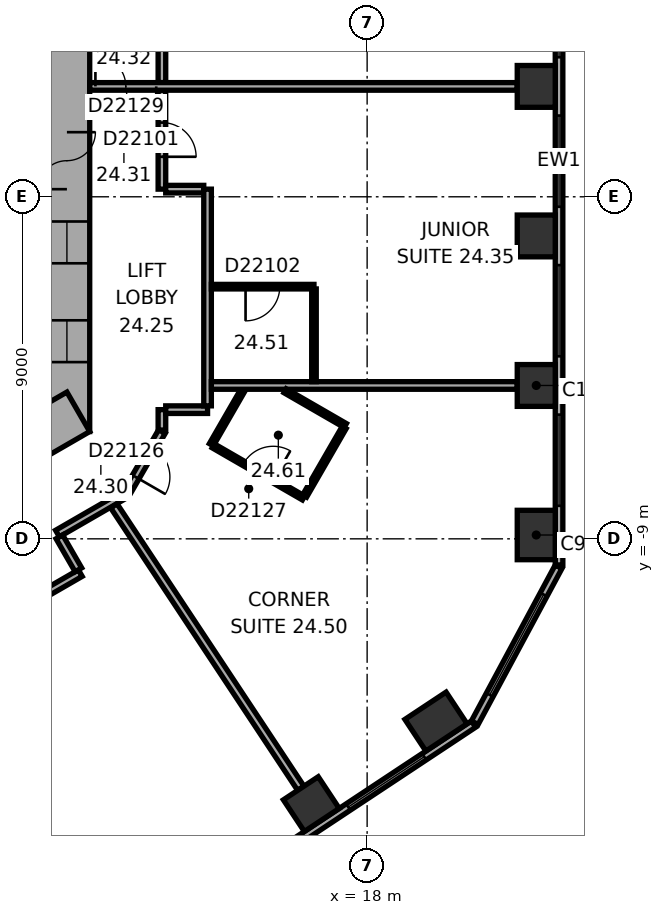
"""IFC4 building model, lengths in metres.
Left out: names, types, materials, properties, quantities, classifications, styles, units other than length and angle.
Written with IfcOpenShell. Run it as: python <this file> out.ifc"""

import sys

from ifc_helpers import new_model, si_unit, direction, frame, frame_2d, origin, origin_2d, place, context, subcontext, project, spatial, rectangle, extrude, element, fill, save


model = new_model("IFC4")
c1 = context("Model", 3, precision=1e-05, world=origin(), true_north=direction((0.0, 1.0)))
c2 = subcontext(c1, "Body", "Model", "MODEL_VIEW")
j1 = project(units=[si_unit("LENGTHUNIT", "METRE"), si_unit("PLANEANGLEUNIT", "RADIAN")], contexts=[c1])
p1 = place(None, origin())
s1 = spatial("IfcSite", under=j1, at=p1, CompositionType="ELEMENT")
p2 = place(p1, origin())
s2 = spatial("IfcBuilding", under=s1, at=p2, CompositionType="ELEMENT")
p3 = place(p2, frame((0.0, 0.0, 103.4)))
s3 = spatial("IfcBuildingStorey", under=s2, at=p3, CompositionType="ELEMENT", Elevation=103.4)
p4 = place(p3, frame((22.45, -8.899, 0.0), z_axis=(0.0, 0.0, 1.0), x_axis=(0.0, 1.0, 0.0)))
e1 = element("IfcColumn", 1, at=p4, inside=s3, PredefinedType="COLUMN", context=c2, shape_type="SweptSolid", body=[
    extrude(rectangle(XDim=1.3, YDim=1.0, at=origin_2d()), origin(), (0.0, 0.0, 1.0), 3.3),
])
for number, where, z_axis, x_axis in (
    (2, (22.45, -4.965, 0.0), (0.0, 0.0, 1.0), (0.0, 1.0, 0.0)),
    (3, (22.45, -1.03, 0.0), (0.0, 0.0, 1.0), (0.0, 1.0, 0.0)),
    (4, (22.45, 2.905, 0.0), (0.0, 0.0, 1.0), (0.0, 1.0, 0.0)),
    (5, (16.531, -15.981, 0.0), (0.0, 0.0, 1.0), (0.834, 0.552, 0.0)),
):
    element("IfcColumn", number, at=place(p3, frame(where, z_axis=z_axis, x_axis=x_axis)), inside=s3, PredefinedType="COLUMN", context=c2, shape_type="SweptSolid", body=[
        extrude(rectangle(XDim=1.1, YDim=1.0, at=origin_2d()), origin(), (0.0, 0.0, 1.0), 3.3),
    ])
p5 = place(p3, frame((19.812, -13.809, 0.0), z_axis=(0.0, 0.0, 1.0), x_axis=(0.833885822067, 0.551936985312, 0.0)))
e6 = element("IfcColumn", 6, at=p5, inside=s3, PredefinedType="COLUMN", context=c2, shape_type="SweptSolid", body=[
    extrude(rectangle(XDim=1.3, YDim=1.0, at=origin_2d()), origin(), (0.0, 0.0, 1.0), 3.3),
])
p6 = place(p3, frame((10.1, -6.177, 0.0), z_axis=(0.0, 0.0, 1.0), x_axis=(0.0, 1.0, 0.0)))
e7 = element("IfcWall", 7, at=p6, inside=s3, PredefinedType="SHEAR", context=c2, shape_type="SweptSolid", body=[
    extrude(rectangle(XDim=12.355, YDim=1.2, at=frame_2d((6.177, 0.0))), origin(), (0.0, 0.0, 1.0), 3.3),
])
p7 = place(p6, frame((6.378, 0.0, 0.0)))
e8 = element("IfcOpeningElement", 8, at=p7, cuts=e7, PredefinedType="OPENING", context=c2, shape_type="SweptSolid", body=[
    extrude(rectangle(XDim=1.5, YDim=2.1, at=frame_2d((0.75, 1.05))), frame((0.0, 0.61, 0.0), z_axis=(0.0, -1.0, 0.0), x_axis=(1.0, 0.0, 0.0)), (0.0, 0.0, 1.0), 1.22),
])
p8 = place(p6, frame((1.828, 0.0, 0.0)))
e9 = element("IfcOpeningElement", 9, at=p8, cuts=e7, PredefinedType="OPENING", context=c2, shape_type="SweptSolid", body=[
    extrude(rectangle(XDim=1.1, YDim=2.1, at=frame_2d((0.55, 1.05))), frame((0.0, 0.61, 0.0), z_axis=(0.0, -1.0, 0.0), x_axis=(1.0, 0.0, 0.0)), (0.0, 0.0, 1.0), 1.22),
])
p9 = place(p6, frame((4.427, 0.0, 0.0)))
e10 = element("IfcOpeningElement", 10, at=p9, cuts=e7, PredefinedType="OPENING", context=c2, shape_type="SweptSolid", body=[
    extrude(rectangle(XDim=1.1, YDim=2.1, at=frame_2d((0.55, 1.05))), frame((0.0, 0.61, 0.0), z_axis=(0.0, -1.0, 0.0), x_axis=(1.0, 0.0, 0.0)), (0.0, 0.0, 1.0), 1.22),
])
p10 = place(p3, frame((-0.3, -11.836, 0.0), z_axis=(0.0, 0.0, 1.0), x_axis=(0.866021384402, 0.500006961711, 0.0)))
e11 = element("IfcWall", 11, at=p10, inside=s3, PredefinedType="SHEAR", context=c2, shape_type="SweptSolid", body=[
    extrude(rectangle(XDim=12.355, YDim=1.2, at=frame_2d((6.178, 0.0))), origin(), (0.0, 0.0, 1.0), 3.3),
])
p11 = place(p10, frame((4.128, 0.0, 0.0)))
e12 = element("IfcOpeningElement", 12, at=p11, cuts=e11, PredefinedType="OPENING", context=c2, shape_type="SweptSolid", body=[
    extrude(rectangle(XDim=0.9, YDim=2.1, at=frame_2d((0.45, 1.05))), frame((0.0, 0.61, 0.0), z_axis=(0.0, -1.0, 0.0), x_axis=(1.0, 0.0, 0.0)), (0.0, 0.0, 1.0), 1.22),
])
p12 = place(p10, frame((7.928, 0.0, 0.0)))
e13 = element("IfcOpeningElement", 13, at=p12, cuts=e11, PredefinedType="OPENING", context=c2, shape_type="SweptSolid", body=[
    extrude(rectangle(XDim=1.1, YDim=2.1, at=frame_2d((0.55, 1.05))), frame((0.0, 0.61, 0.0), z_axis=(0.0, -1.0, 0.0), x_axis=(1.0, 0.0, 0.0)), (0.0, 0.0, 1.0), 1.22),
])
p13 = place(p3, frame((23.05, -9.687, 0.0), z_axis=(0.0, 0.0, 1.0), x_axis=(0.0, 1.0, 0.0)))
e14 = element("IfcWall", 14, at=p13, inside=s3, PredefinedType="STANDARD", context=c2, shape_type="SweptSolid", body=[
    extrude(rectangle(XDim=21.246, YDim=0.2, at=frame_2d((10.623, 0.0))), origin(), (0.0, 0.0, 1.0), 3.3),
])
p14 = place(p13, frame((1.555, 0.0, 0.8)))
e15 = element("IfcOpeningElement", 15, at=p14, cuts=e14, PredefinedType="OPENING", context=c2, shape_type="SweptSolid", body=[
    extrude(rectangle(XDim=2.4, YDim=1.7, at=frame_2d((1.2, 0.85))), frame((0.0, 0.11, 0.0), z_axis=(0.0, -1.0, 0.0), x_axis=(1.0, 0.0, 0.0)), (0.0, 0.0, 1.0), 0.22),
])
p15 = place(p13, frame((5.489, 0.0, 0.8)))
e16 = element("IfcOpeningElement", 16, at=p15, cuts=e14, PredefinedType="OPENING", context=c2, shape_type="SweptSolid", body=[
    extrude(rectangle(XDim=2.4, YDim=1.7, at=frame_2d((1.2, 0.85))), frame((0.0, 0.11, 0.0), z_axis=(0.0, -1.0, 0.0), x_axis=(1.0, 0.0, 0.0)), (0.0, 0.0, 1.0), 0.22),
])
p16 = place(p13, frame((9.424, 0.0, 0.8)))
e17 = element("IfcOpeningElement", 17, at=p16, cuts=e14, PredefinedType="OPENING", context=c2, shape_type="SweptSolid", body=[
    extrude(rectangle(XDim=2.4, YDim=1.7, at=frame_2d((1.2, 0.85))), frame((0.0, 0.11, 0.0), z_axis=(0.0, -1.0, 0.0), x_axis=(1.0, 0.0, 0.0)), (0.0, 0.0, 1.0), 0.22),
])
p17 = place(p13, frame((13.358, 0.0, 0.8)))
e18 = element("IfcOpeningElement", 18, at=p17, cuts=e14, PredefinedType="OPENING", context=c2, shape_type="SweptSolid", body=[
    extrude(rectangle(XDim=2.4, YDim=1.7, at=frame_2d((1.2, 0.85))), frame((0.0, 0.11, 0.0), z_axis=(0.0, -1.0, 0.0), x_axis=(1.0, 0.0, 0.0)), (0.0, 0.0, 1.0), 0.22),
])
p18 = place(p13, frame((17.293, 0.0, 0.8)))
e19 = element("IfcOpeningElement", 19, at=p18, cuts=e14, PredefinedType="OPENING", context=c2, shape_type="SweptSolid", body=[
    extrude(rectangle(XDim=2.4, YDim=1.7, at=frame_2d((1.2, 0.85))), frame((0.0, 0.11, 0.0), z_axis=(0.0, -1.0, 0.0), x_axis=(1.0, 0.0, 0.0)), (0.0, 0.0, 1.0), 0.22),
])
p19 = place(p3, frame((3.083, -25.601, 0.0), z_axis=(0.0, 0.0, 1.0), x_axis=(0.833884295743, 0.551939291329, 0.0)))
e20 = element("IfcWall", 20, at=p19, inside=s3, PredefinedType="STANDARD", context=c2, shape_type="SweptSolid", body=[
    extrude(rectangle(XDim=21.246, YDim=0.2, at=frame_2d((10.623, 0.0))), origin(), (0.0, 0.0, 1.0), 3.3),
])
p20 = place(p19, frame((1.553, 0.0, 0.8)))
e21 = element("IfcOpeningElement", 21, at=p20, cuts=e20, PredefinedType="OPENING", context=c2, shape_type="SweptSolid", body=[
    extrude(rectangle(XDim=2.4, YDim=1.7, at=frame_2d((1.2, 0.85))), frame((0.0, 0.11, 0.0), z_axis=(0.0, -1.0, 0.0), x_axis=(1.0, 0.0, 0.0)), (0.0, 0.0, 1.0), 0.22),
])
p21 = place(p19, frame((5.488, 0.0, 0.8)))
e22 = element("IfcOpeningElement", 22, at=p21, cuts=e20, PredefinedType="OPENING", context=c2, shape_type="SweptSolid", body=[
    extrude(rectangle(XDim=2.4, YDim=1.7, at=frame_2d((1.2, 0.85))), frame((0.0, 0.11, 0.0), z_axis=(0.0, -1.0, 0.0), x_axis=(1.0, 0.0, 0.0)), (0.0, 0.0, 1.0), 0.22),
])
p22 = place(p19, frame((9.422, 0.0, 0.8)))
e23 = element("IfcOpeningElement", 23, at=p22, cuts=e20, PredefinedType="OPENING", context=c2, shape_type="SweptSolid", body=[
    extrude(rectangle(XDim=2.4, YDim=1.7, at=frame_2d((1.2, 0.85))), frame((0.0, 0.11, 0.0), z_axis=(0.0, -1.0, 0.0), x_axis=(1.0, 0.0, 0.0)), (0.0, 0.0, 1.0), 0.22),
])
p23 = place(p19, frame((13.357, 0.0, 0.8)))
e24 = element("IfcOpeningElement", 24, at=p23, cuts=e20, PredefinedType="OPENING", context=c2, shape_type="SweptSolid", body=[
    extrude(rectangle(XDim=2.4, YDim=1.7, at=frame_2d((1.2, 0.85))), frame((0.0, 0.11, 0.0), z_axis=(0.0, -1.0, 0.0), x_axis=(1.0, 0.0, 0.0)), (0.0, 0.0, 1.0), 0.22),
])
p24 = place(p19, frame((17.291, 0.0, 0.8)))
e25 = element("IfcOpeningElement", 25, at=p24, cuts=e20, PredefinedType="OPENING", context=c2, shape_type="SweptSolid", body=[
    extrude(rectangle(XDim=2.4, YDim=1.7, at=frame_2d((1.2, 0.85))), frame((0.0, 0.11, 0.0), z_axis=(0.0, -1.0, 0.0), x_axis=(1.0, 0.0, 0.0)), (0.0, 0.0, 1.0), 0.22),
])
p25 = place(p3, frame((20.833, -13.839, 0.0), z_axis=(0.0, 0.0, 1.0), x_axis=(0.473321668581, 0.880889662813, 0.0)))
e26 = element("IfcWall", 26, at=p25, inside=s3, PredefinedType="STANDARD", context=c2, shape_type="SweptSolid", body=[
    extrude(rectangle(XDim=4.66, YDim=0.2, at=frame_2d((2.33, 0.0))), origin(), (0.0, 0.0, 1.0), 3.3),
])
p26 = place(p25, frame((0.83, 0.0, 0.8)))
e27 = element("IfcOpeningElement", 27, at=p26, cuts=e26, PredefinedType="OPENING", context=c2, shape_type="SweptSolid", body=[
    extrude(rectangle(XDim=3.0, YDim=1.7, at=frame_2d((1.5, 0.85))), frame((0.0, 0.11, 0.0), z_axis=(0.0, -1.0, 0.0), x_axis=(1.0, 0.0, 0.0)), (0.0, 0.0, 1.0), 0.22),
])
p27 = place(p3, frame((7.419, -11.653, 0.0), z_axis=(0.0, 0.0, 1.0), x_axis=(0.866038154057, 0.49997791523, 0.0)))
e28 = element("IfcWall", 28, at=p27, inside=s3, PredefinedType="PARTITIONING", context=c2, shape_type="SweptSolid", body=[
    extrude(rectangle(XDim=3.502, YDim=0.2, at=frame_2d((1.751, 0.0))), origin(), (0.0, 0.0, 1.0), 3.05),
])
p28 = place(p3, frame((9.852, -8.861, 0.0), z_axis=(0.0, 0.0, 1.0), x_axis=(0.866013291437, 0.500020978615, 0.0)))
e29 = element("IfcWall", 29, at=p28, inside=s3, PredefinedType="PARTITIONING", context=c2, shape_type="SweptSolid", body=[
    extrude(rectangle(XDim=2.077, YDim=0.2, at=frame_2d((1.038, 0.0))), origin(), (0.0, 0.0, 1.0), 3.05),
])
p29 = place(p3, frame((10.402, -9.815, 0.0), z_axis=(0.0, 0.0, 1.0), x_axis=(-0.499968756647, 0.866043441391, 0.0)))
e30 = element("IfcWall", 30, at=p29, inside=s3, PredefinedType="PARTITIONING", context=c2, shape_type="SweptSolid", body=[
    extrude(rectangle(XDim=1.001, YDim=0.2, at=frame_2d((0.5, 0.0))), origin(), (0.0, 0.0, 1.0), 3.05),
])
p30 = place(p3, frame((11.67, -7.788, 0.0), z_axis=(0.0, 0.0, 1.0), x_axis=(0.500063286585, 0.865988862174, 0.0)))
e31 = element("IfcWall", 31, at=p30, inside=s3, PredefinedType="PARTITIONING", context=c2, shape_type="SweptSolid", body=[
    extrude(rectangle(XDim=1.86, YDim=0.2, at=frame_2d((0.93, 0.0))), origin(), (0.0, 0.0, 1.0), 3.05),
])
p31 = place(p30, frame((0.48, 0.0, 0.0)))
e32 = element("IfcOpeningElement", 32, at=p31, cuts=e31, PredefinedType="OPENING", context=c2, shape_type="SweptSolid", body=[
    extrude(rectangle(XDim=0.9, YDim=2.1, at=frame_2d((0.45, 1.05))), frame((0.0, 0.11, 0.0), z_axis=(0.0, -1.0, 0.0), x_axis=(1.0, 0.0, 0.0)), (0.0, 0.0, 1.0), 0.22),
])
p32 = place(p3, frame((12.6, -6.138, 0.0), z_axis=(0.0, 0.0, 1.0), x_axis=(0.0, 1.0, 0.0)))
e33 = element("IfcWall", 33, at=p32, inside=s3, PredefinedType="PARTITIONING", context=c2, shape_type="SweptSolid", body=[
    extrude(rectangle(XDim=0.537, YDim=0.2, at=frame_2d((0.268, 0.0))), origin(), (0.0, 0.0, 1.0), 3.05),
])
p33 = place(p3, frame((12.6, 0.201, 0.0), z_axis=(0.0, 0.0, 1.0), x_axis=(0.0, 1.0, 0.0)))
e34 = element("IfcWall", 34, at=p33, inside=s3, PredefinedType="PARTITIONING", context=c2, shape_type="SweptSolid", body=[
    extrude(rectangle(XDim=2.604, YDim=0.2, at=frame_2d((1.302, 0.0))), origin(), (0.0, 0.0, 1.0), 3.05),
])
p34 = place(p33, frame((0.852, 0.0, 0.0)))
e35 = element("IfcOpeningElement", 35, at=p34, cuts=e34, PredefinedType="OPENING", context=c2, shape_type="SweptSolid", body=[
    extrude(rectangle(XDim=0.9, YDim=2.1, at=frame_2d((0.45, 1.05))), frame((0.0, 0.11, 0.0), z_axis=(0.0, -1.0, 0.0), x_axis=(1.0, 0.0, 0.0)), (0.0, 0.0, 1.0), 0.22),
])
p35 = place(p3, frame((12.6, 3.004, 0.0), z_axis=(0.0, 0.0, 1.0), x_axis=(0.0, 1.0, 0.0)))
e36 = element("IfcWall", 36, at=p35, inside=s3, PredefinedType="PARTITIONING", context=c2, shape_type="SweptSolid", body=[
    extrude(rectangle(XDim=3.173, YDim=0.2, at=frame_2d((1.586, 0.0))), origin(), (0.0, 0.0, 1.0), 3.05),
])
p36 = place(p35, frame((1.136, 0.0, 0.0)))
e37 = element("IfcOpeningElement", 37, at=p36, cuts=e36, PredefinedType="OPENING", context=c2, shape_type="SweptSolid", body=[
    extrude(rectangle(XDim=0.9, YDim=2.1, at=frame_2d((0.45, 1.05))), frame((0.0, 0.11, 0.0), z_axis=(0.0, -1.0, 0.0), x_axis=(1.0, 0.0, 0.0)), (0.0, 0.0, 1.0), 0.22),
])
p37 = place(p3, frame((12.7, -5.601, 0.0), z_axis=(0.0, 0.0, 1.0), x_axis=(1.0, 0.0, 0.0)))
e38 = element("IfcWall", 38, at=p37, inside=s3, PredefinedType="PARTITIONING", context=c2, shape_type="SweptSolid", body=[
    extrude(rectangle(XDim=1.101, YDim=0.2, at=frame_2d((0.551, 0.0))), origin(), (0.0, 0.0, 1.0), 3.05),
])
p38 = place(p3, frame((13.701, 0.201, 0.0), z_axis=(0.0, 0.0, 1.0), x_axis=(-1.0, 0.0, 0.0)))
e39 = element("IfcWall", 39, at=p38, inside=s3, PredefinedType="PARTITIONING", context=c2, shape_type="SweptSolid", body=[
    extrude(rectangle(XDim=1.001, YDim=0.2, at=frame_2d((0.5, 0.0))), origin(), (0.0, 0.0, 1.0), 3.05),
])
p39 = place(p3, frame((13.801, -5.501, 0.0), z_axis=(0.0, 0.0, 1.0), x_axis=(0.0, 1.0, 0.0)))
e40 = element("IfcWall", 40, at=p39, inside=s3, PredefinedType="PARTITIONING", context=c2, shape_type="SweptSolid", body=[
    extrude(rectangle(XDim=5.702, YDim=0.2, at=frame_2d((2.851, 0.0))), origin(), (0.0, 0.0, 1.0), 3.05),
])
p40 = place(p3, frame((13.901, -6.524, 0.0), z_axis=(0.0, 0.0, 1.0), x_axis=(0.499964162598, 0.86604609353, 0.0)))
e41 = element("IfcWall", 41, at=p40, inside=s3, PredefinedType="PARTITIONING", context=c2, shape_type="SweptSolid", body=[
    extrude(rectangle(XDim=1.661, YDim=0.12, at=frame_2d((0.831, 0.0))), origin(), (0.0, 0.0, 1.0), 3.05),
])
p41 = place(p3, frame((13.901, -4.965, 0.0), z_axis=(0.0, 0.0, 1.0), x_axis=(1.0, 0.0, 0.0)))
e42 = element("IfcWall", 42, at=p41, inside=s3, PredefinedType="PARTITIONING", context=c2, shape_type="SweptSolid", body=[
    extrude(rectangle(XDim=8.049, YDim=0.2, at=frame_2d((4.024, 0.0))), origin(), (0.0, 0.0, 1.0), 3.05),
])
p42 = place(p3, frame((13.901, -2.365, 0.0), z_axis=(0.0, 0.0, 1.0), x_axis=(1.0, 0.0, 0.0)))
e43 = element("IfcWall", 43, at=p42, inside=s3, PredefinedType="PARTITIONING", context=c2, shape_type="SweptSolid", body=[
    extrude(rectangle(XDim=2.7, YDim=0.12, at=frame_2d((1.35, 0.0))), origin(), (0.0, 0.0, 1.0), 3.05),
])
p43 = place(p42, frame((0.9, 0.0, 0.0)))
e44 = element("IfcOpeningElement", 44, at=p43, cuts=e43, PredefinedType="OPENING", context=c2, shape_type="SweptSolid", body=[
    extrude(rectangle(XDim=0.9, YDim=2.1, at=frame_2d((0.45, 1.05))), frame((0.0, 0.07, 0.0), z_axis=(0.0, -1.0, 0.0), x_axis=(1.0, 0.0, 0.0)), (0.0, 0.0, 1.0), 0.14),
])
p44 = place(p3, frame((15.841, -5.104, 0.0), z_axis=(0.0, 0.0, 1.0), x_axis=(0.866025591402, -0.499999675036, 0.0)))
e45 = element("IfcWall", 45, at=p44, inside=s3, PredefinedType="PARTITIONING", context=c2, shape_type="SweptSolid", body=[
    extrude(rectangle(XDim=1.83, YDim=0.12, at=frame_2d((0.915, 0.0))), origin(), (0.0, 0.0, 1.0), 3.05),
])
p45 = place(p3, frame((16.255, -15.564, 0.0), z_axis=(0.0, 0.0, 1.0), x_axis=(-0.55192208744, 0.833895682562, 0.0)))
e46 = element("IfcWall", 46, at=p45, inside=s3, PredefinedType="PARTITIONING", context=c2, shape_type="SweptSolid", body=[
    extrude(rectangle(XDim=8.913, YDim=0.2, at=frame_2d((4.457, 0.0))), origin(), (0.0, 0.0, 1.0), 2.6),
])
p46 = place(p3, frame((16.326, -7.925, 0.0), z_axis=(0.0, 0.0, 1.0), x_axis=(-0.865997131366, 0.500048966069, 0.0)))
e47 = element("IfcWall", 47, at=p46, inside=s3, PredefinedType="PARTITIONING", context=c2, shape_type="SweptSolid", body=[
    extrude(rectangle(XDim=2.74, YDim=0.12, at=frame_2d((1.37, 0.0))), origin(), (0.0, 0.0, 1.0), 3.05),
])
p47 = place(p46, frame((0.92, 0.0, 0.0)))
e48 = element("IfcOpeningElement", 48, at=p47, cuts=e47, PredefinedType="OPENING", context=c2, shape_type="SweptSolid", body=[
    extrude(rectangle(XDim=0.9, YDim=2.1, at=frame_2d((0.45, 1.05))), frame((0.0, 0.07, 0.0), z_axis=(0.0, -1.0, 0.0), x_axis=(1.0, 0.0, 0.0)), (0.0, 0.0, 1.0), 0.14),
])
p48 = place(p3, frame((16.601, -2.425, 0.0), z_axis=(0.0, 0.0, 1.0), x_axis=(0.0, -1.0, 0.0)))
e49 = element("IfcWall", 49, at=p48, inside=s3, PredefinedType="PARTITIONING", context=c2, shape_type="SweptSolid", body=[
    extrude(rectangle(XDim=2.44, YDim=0.12, at=frame_2d((1.22, 0.0))), origin(), (0.0, 0.0, 1.0), 3.05),
])
p49 = place(p3, frame((17.396, -6.071, 0.0), z_axis=(0.0, 0.0, 1.0), x_axis=(-0.500027264788, -0.866009661879, 0.0)))
e50 = element("IfcWall", 50, at=p49, inside=s3, PredefinedType="PARTITIONING", context=c2, shape_type="SweptSolid", body=[
    extrude(rectangle(XDim=2.08, YDim=0.12, at=frame_2d((1.04, 0.0))), origin(), (0.0, 0.0, 1.0), 3.05),
])
p50 = place(p3, frame((21.95, 2.905, 0.0), z_axis=(0.0, 0.0, 1.0), x_axis=(-1.0, 0.0, 0.0)))
e51 = element("IfcWall", 51, at=p50, inside=s3, PredefinedType="PARTITIONING", context=c2, shape_type="SweptSolid", body=[
    extrude(rectangle(XDim=11.25, YDim=0.2, at=frame_2d((5.625, 0.0))), origin(), (0.0, 0.0, 1.0), 3.05),
])
p51 = place(p50, frame((9.5, 0.0, 0.0)))
e52 = element("IfcOpeningElement", 52, at=p51, cuts=e51, PredefinedType="OPENING", context=c2, shape_type="SweptSolid", body=[
    extrude(rectangle(XDim=1.6, YDim=2.1, at=frame_2d((0.8, 1.05))), frame((0.0, 0.11, 0.0), z_axis=(0.0, -1.0, 0.0), x_axis=(1.0, 0.0, 0.0)), (0.0, 0.0, 1.0), 0.22),
])
p52 = place(p14, origin())
e53 = element("IfcWindow", 53, at=p52, inside=s3, PartitioningType="SINGLE_PANEL", PredefinedType="WINDOW", context=c2, shape_type="SweptSolid", body=[
    extrude(rectangle(XDim=2.4, YDim=1.7, at=frame_2d((1.2, 0.85))), frame((0.0, 0.03, 0.0), z_axis=(0.0, -1.0, 0.0), x_axis=(1.0, 0.0, 0.0)), (0.0, 0.0, 1.0), 0.06),
])
fill(e15, e53)
p53 = place(p15, origin())
e54 = element("IfcWindow", 54, at=p53, inside=s3, PartitioningType="SINGLE_PANEL", PredefinedType="WINDOW", context=c2, shape_type="SweptSolid", body=[
    extrude(rectangle(XDim=2.4, YDim=1.7, at=frame_2d((1.2, 0.85))), frame((0.0, 0.03, 0.0), z_axis=(0.0, -1.0, 0.0), x_axis=(1.0, 0.0, 0.0)), (0.0, 0.0, 1.0), 0.06),
])
fill(e16, e54)
p54 = place(p16, origin())
e55 = element("IfcWindow", 55, at=p54, inside=s3, PartitioningType="SINGLE_PANEL", PredefinedType="WINDOW", context=c2, shape_type="SweptSolid", body=[
    extrude(rectangle(XDim=2.4, YDim=1.7, at=frame_2d((1.2, 0.85))), frame((0.0, 0.03, 0.0), z_axis=(0.0, -1.0, 0.0), x_axis=(1.0, 0.0, 0.0)), (0.0, 0.0, 1.0), 0.06),
])
fill(e17, e55)
p55 = place(p17, origin())
e56 = element("IfcWindow", 56, at=p55, inside=s3, PartitioningType="SINGLE_PANEL", PredefinedType="WINDOW", context=c2, shape_type="SweptSolid", body=[
    extrude(rectangle(XDim=2.4, YDim=1.7, at=frame_2d((1.2, 0.85))), frame((0.0, 0.03, 0.0), z_axis=(0.0, -1.0, 0.0), x_axis=(1.0, 0.0, 0.0)), (0.0, 0.0, 1.0), 0.06),
])
fill(e18, e56)
p56 = place(p24, origin())
e57 = element("IfcWindow", 57, at=p56, inside=s3, PartitioningType="SINGLE_PANEL", PredefinedType="WINDOW", context=c2, shape_type="SweptSolid", body=[
    extrude(rectangle(XDim=2.4, YDim=1.7, at=frame_2d((1.2, 0.85))), frame((0.0, 0.03, 0.0), z_axis=(0.0, -1.0, 0.0), x_axis=(1.0, 0.0, 0.0)), (0.0, 0.0, 1.0), 0.06),
])
fill(e25, e57)
p57 = place(p26, origin())
e58 = element("IfcWindow", 58, at=p57, inside=s3, PartitioningType="SINGLE_PANEL", PredefinedType="WINDOW", context=c2, shape_type="SweptSolid", body=[
    extrude(rectangle(XDim=3.0, YDim=1.7, at=frame_2d((1.5, 0.85))), frame((0.0, 0.03, 0.0), z_axis=(0.0, -1.0, 0.0), x_axis=(1.0, 0.0, 0.0)), (0.0, 0.0, 1.0), 0.06),
])
fill(e27, e58)
p58 = place(p7, origin())
e59 = element("IfcDoor", 59, at=p58, inside=s3, OperationType="DOUBLE_DOOR_SINGLE_SWING", PredefinedType="DOOR", context=c2, shape_type="SweptSolid", body=[
    extrude(rectangle(XDim=1.5, YDim=2.1, at=frame_2d((0.75, 1.05))), frame((0.0, 0.025, 0.0), z_axis=(0.0, -1.0, 0.0), x_axis=(1.0, 0.0, 0.0)), (0.0, 0.0, 1.0), 0.05),
])
fill(e8, e59)
p59 = place(p8, origin())
e60 = element("IfcDoor", 60, at=p59, inside=s3, OperationType="DOUBLE_DOOR_SLIDING", PredefinedType="DOOR", context=c2, shape_type="SweptSolid", body=[
    extrude(rectangle(XDim=1.1, YDim=2.1, at=frame_2d((0.55, 1.05))), frame((0.0, 0.025, 0.0), z_axis=(0.0, -1.0, 0.0), x_axis=(1.0, 0.0, 0.0)), (0.0, 0.0, 1.0), 0.05),
])
fill(e9, e60)
p60 = place(p9, origin())
e61 = element("IfcDoor", 61, at=p60, inside=s3, OperationType="DOUBLE_DOOR_SLIDING", PredefinedType="DOOR", context=c2, shape_type="SweptSolid", body=[
    extrude(rectangle(XDim=1.1, YDim=2.1, at=frame_2d((0.55, 1.05))), frame((0.0, 0.025, 0.0), z_axis=(0.0, -1.0, 0.0), x_axis=(1.0, 0.0, 0.0)), (0.0, 0.0, 1.0), 0.05),
])
fill(e10, e61)
p61 = place(p34, origin())
e62 = element("IfcDoor", 62, at=p61, inside=s3, OperationType="SINGLE_SWING_LEFT", PredefinedType="DOOR", context=c2, shape_type="SweptSolid", body=[
    extrude(rectangle(XDim=0.9, YDim=2.1, at=frame_2d((0.45, 1.05))), frame((0.0, 0.025, 0.0), z_axis=(0.0, -1.0, 0.0), x_axis=(1.0, 0.0, 0.0)), (0.0, 0.0, 1.0), 0.05),
])
fill(e35, e62)
p62 = place(p43, origin())
e63 = element("IfcDoor", 63, at=p62, inside=s3, OperationType="SINGLE_SWING_LEFT", PredefinedType="DOOR", context=c2, shape_type="SweptSolid", body=[
    extrude(rectangle(XDim=0.9, YDim=2.1, at=frame_2d((0.45, 1.05))), frame((0.0, 0.025, 0.0), z_axis=(0.0, -1.0, 0.0), x_axis=(1.0, 0.0, 0.0)), (0.0, 0.0, 1.0), 0.05),
])
fill(e44, e63)
p63 = place(p31, origin())
e64 = element("IfcDoor", 64, at=p63, inside=s3, OperationType="SINGLE_SWING_LEFT", PredefinedType="DOOR", context=c2, shape_type="SweptSolid", body=[
    extrude(rectangle(XDim=0.9, YDim=2.1, at=frame_2d((0.45, 1.05))), frame((0.0, 0.025, 0.0), z_axis=(0.0, -1.0, 0.0), x_axis=(1.0, 0.0, 0.0)), (0.0, 0.0, 1.0), 0.05),
])
fill(e32, e64)
p64 = place(p47, origin())
e65 = element("IfcDoor", 65, at=p64, inside=s3, OperationType="SINGLE_SWING_LEFT", PredefinedType="DOOR", context=c2, shape_type="SweptSolid", body=[
    extrude(rectangle(XDim=0.9, YDim=2.1, at=frame_2d((0.45, 1.05))), frame((0.0, 0.025, 0.0), z_axis=(0.0, -1.0, 0.0), x_axis=(1.0, 0.0, 0.0)), (0.0, 0.0, 1.0), 0.05),
])
fill(e48, e65)
p65 = place(p51, origin())
e66 = element("IfcDoor", 66, at=p65, inside=s3, OperationType="DOUBLE_DOOR_SINGLE_SWING", PredefinedType="DOOR", context=c2, shape_type="SweptSolid", body=[
    extrude(rectangle(XDim=1.6, YDim=2.1, at=frame_2d((0.8, 1.05))), frame((0.0, 0.025, 0.0), z_axis=(0.0, -1.0, 0.0), x_axis=(1.0, 0.0, 0.0)), (0.0, 0.0, 1.0), 0.05),
])
fill(e52, e66)
save(model, sys.argv[1])
